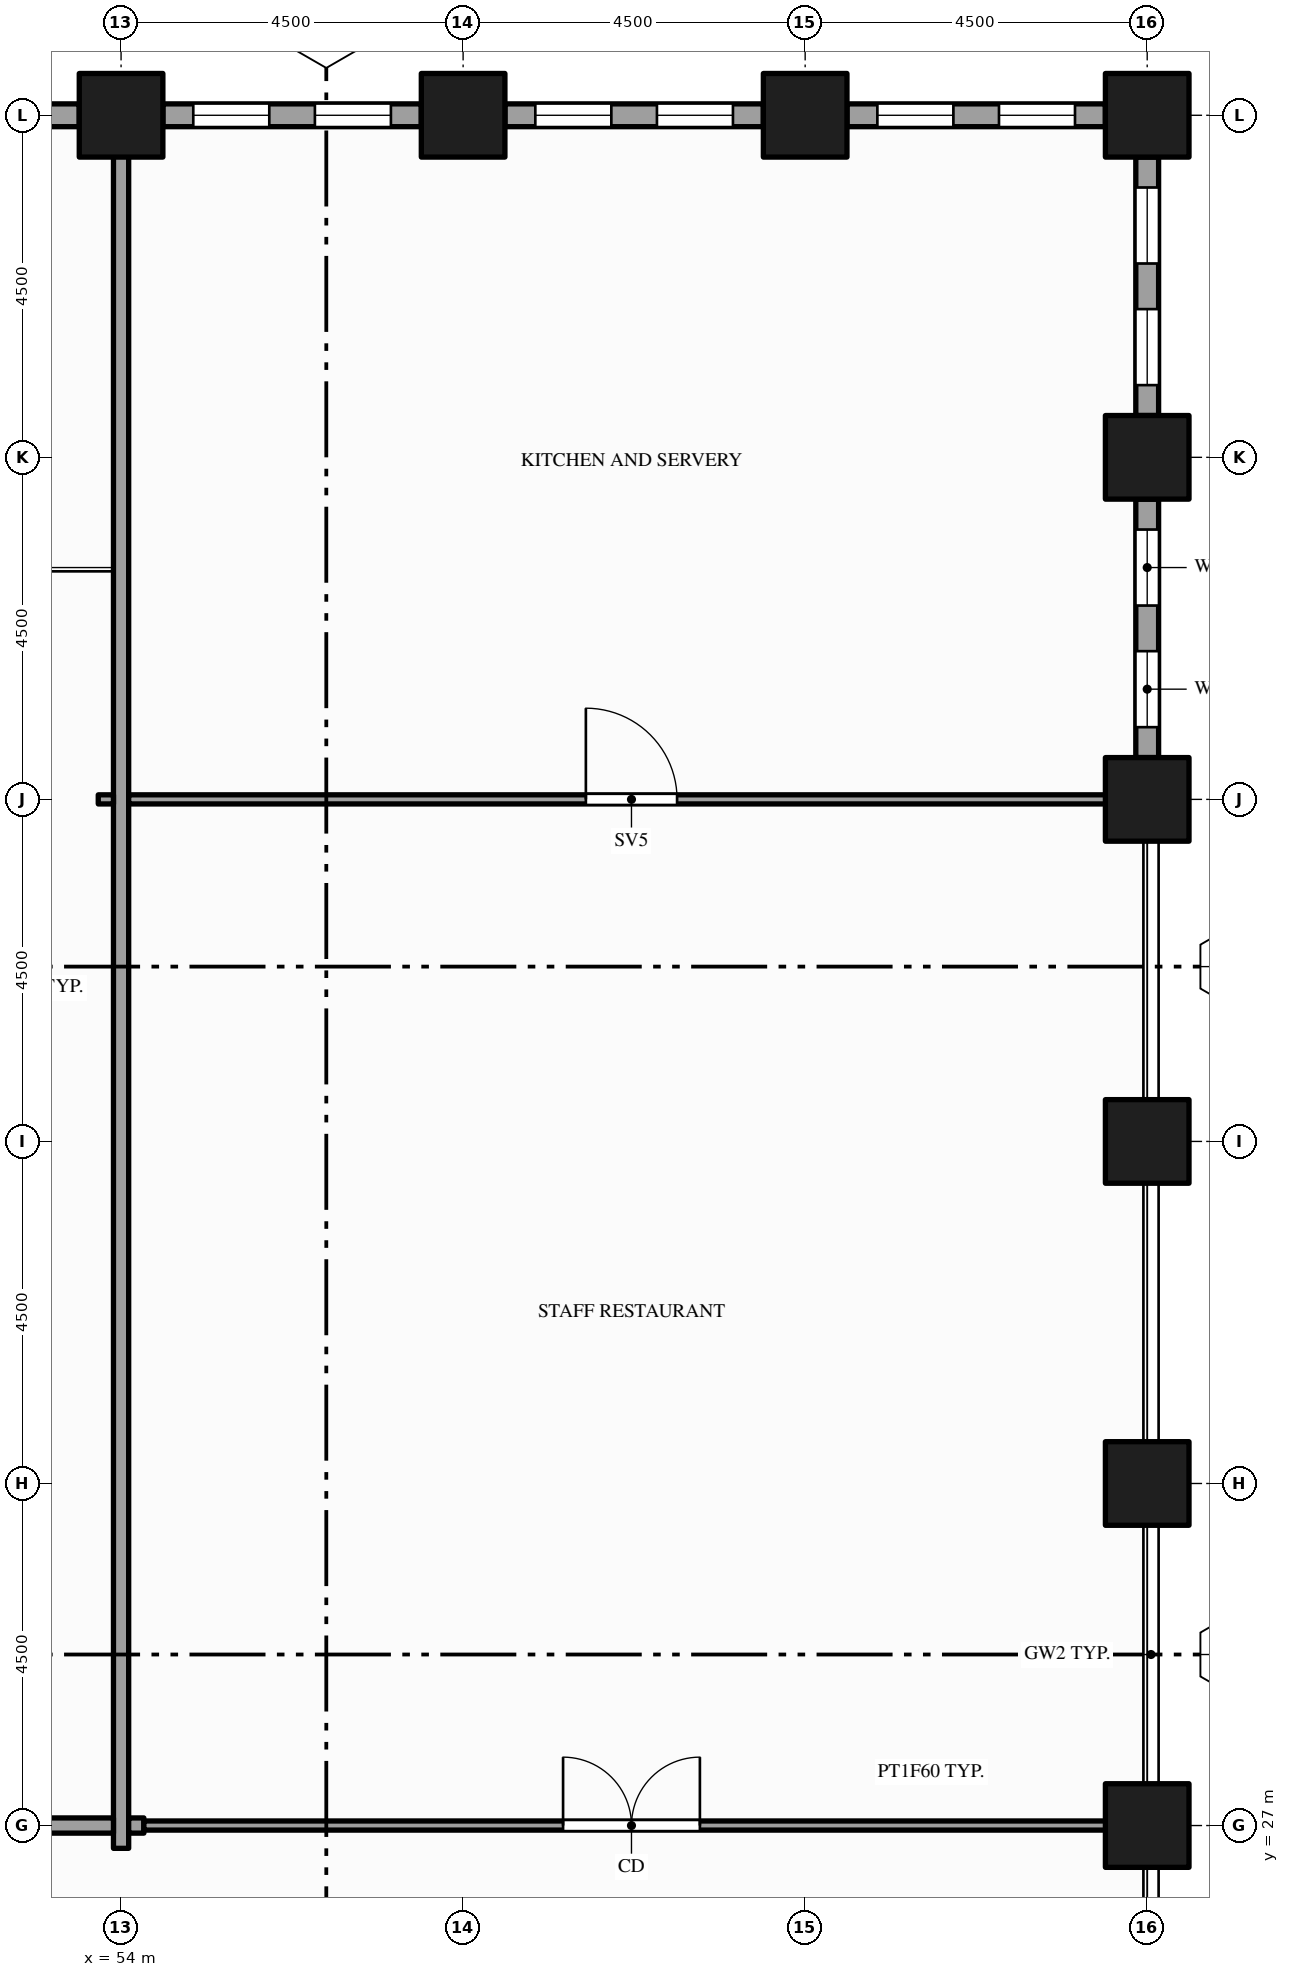
"""IFC4 building model, lengths in metres.
Left out: names, types, materials, properties, quantities, classifications, styles, units other than length and angle.
Written with IfcOpenShell. Run it as: python <this file> out.ifc"""

import sys

from ifc_helpers import new_model, si_unit, direction, frame, frame_2d, origin, origin_2d, place, context, subcontext, project, spatial, rectangle, hollow_rectangle, extrude, element, fill, save


model = new_model("IFC4")
c1 = context("Model", 3, precision=1e-05, world=origin(), true_north=direction((0.0, 1.0)))
c2 = subcontext(c1, "Body", "Model", "MODEL_VIEW")
j1 = project(units=[si_unit("LENGTHUNIT", "METRE"), si_unit("PLANEANGLEUNIT", "RADIAN")], contexts=[c1])
p1 = place(None, origin())
s1 = spatial("IfcSite", under=j1, at=p1, CompositionType="ELEMENT")
p2 = place(p1, origin())
s2 = spatial("IfcBuilding", under=s1, at=p2, CompositionType="ELEMENT")
p3 = place(p2, frame((0.0, 0.0, 8.0)))
s3 = spatial("IfcBuildingStorey", under=s2, at=p3, CompositionType="ELEMENT", Elevation=8.0)
for number, where, z_axis, x_axis in (
    (1, (54.0, 49.5, -0.25), (0.0, 0.0, 1.0), (1.0, 0.0, 0.0)),
    (2, (58.5, 49.5, -0.25), (0.0, 0.0, 1.0), (1.0, 0.0, 0.0)),
    (3, (63.0, 49.5, -0.25), (0.0, 0.0, 1.0), (1.0, 0.0, 0.0)),
    (4, (67.5, 27.0, -0.25), (0.0, 0.0, 1.0), (1.0, 0.0, 0.0)),
    (5, (67.5, 31.5, -0.25), (0.0, 0.0, 1.0), (1.0, 0.0, 0.0)),
    (6, (67.5, 36.0, -0.25), (0.0, 0.0, 1.0), (1.0, 0.0, 0.0)),
    (7, (67.5, 40.5, -0.25), (0.0, 0.0, 1.0), (1.0, 0.0, 0.0)),
    (8, (67.5, 45.0, -0.25), (0.0, 0.0, 1.0), (1.0, 0.0, 0.0)),
    (9, (67.5, 49.5, -0.25), (0.0, 0.0, 1.0), (1.0, 0.0, 0.0)),
):
    element("IfcColumn", number, at=place(p3, frame(where, z_axis=z_axis, x_axis=x_axis)), inside=s3, PredefinedType="COLUMN", context=c2, shape_type="SweptSolid", body=[
        extrude(hollow_rectangle(XDim=1.1, YDim=1.1, WallThickness=0.06, at=origin_2d()), origin(), (0.0, 0.0, 1.0), 6.0),
    ])
p4 = place(p3, frame((67.5, 41.05, 0.0), z_axis=(0.0, 0.0, 1.0), x_axis=(0.0, 1.0, 0.0)))
e10 = element("IfcWall", 10, at=p4, inside=s3, PredefinedType="STANDARD", context=c2, shape_type="SweptSolid", body=[
    extrude(rectangle(XDim=3.4, YDim=0.3, at=frame_2d((1.7, 0.0))), origin(), (0.0, 0.0, 1.0), 5.036),
])
p5 = place(p4, frame((0.4, 0.0, 0.9)))
e11 = element("IfcOpeningElement", 11, at=p5, cuts=e10, PredefinedType="OPENING", context=c2, shape_type="SweptSolid", body=[
    extrude(rectangle(XDim=1.0, YDim=3.5, at=frame_2d((0.5, 1.75))), frame((0.0, 0.16, 0.0), z_axis=(0.0, -1.0, 0.0), x_axis=(1.0, 0.0, 0.0)), (0.0, 0.0, 1.0), 0.32),
])
p6 = place(p4, frame((2.0, 0.0, 0.9)))
e12 = element("IfcOpeningElement", 12, at=p6, cuts=e10, PredefinedType="OPENING", context=c2, shape_type="SweptSolid", body=[
    extrude(rectangle(XDim=1.0, YDim=3.5, at=frame_2d((0.5, 1.75))), frame((0.0, 0.16, 0.0), z_axis=(0.0, -1.0, 0.0), x_axis=(1.0, 0.0, 0.0)), (0.0, 0.0, 1.0), 0.32),
])
p7 = place(p3, frame((67.5, 45.55, 0.0), z_axis=(0.0, 0.0, 1.0), x_axis=(0.0, 1.0, 0.0)))
e13 = element("IfcWall", 13, at=p7, inside=s3, PredefinedType="STANDARD", context=c2, shape_type="SweptSolid", body=[
    extrude(rectangle(XDim=3.4, YDim=0.3, at=frame_2d((1.7, 0.0))), origin(), (0.0, 0.0, 1.0), 5.036),
])
p8 = place(p7, frame((0.4, 0.0, 0.9)))
e14 = element("IfcOpeningElement", 14, at=p8, cuts=e13, PredefinedType="OPENING", context=c2, shape_type="SweptSolid", body=[
    extrude(rectangle(XDim=1.0, YDim=3.5, at=frame_2d((0.5, 1.75))), frame((0.0, 0.16, 0.0), z_axis=(0.0, -1.0, 0.0), x_axis=(1.0, 0.0, 0.0)), (0.0, 0.0, 1.0), 0.32),
])
p9 = place(p7, frame((2.0, 0.0, 0.9)))
e15 = element("IfcOpeningElement", 15, at=p9, cuts=e13, PredefinedType="OPENING", context=c2, shape_type="SweptSolid", body=[
    extrude(rectangle(XDim=1.0, YDim=3.5, at=frame_2d((0.5, 1.75))), frame((0.0, 0.16, 0.0), z_axis=(0.0, -1.0, 0.0), x_axis=(1.0, 0.0, 0.0)), (0.0, 0.0, 1.0), 0.32),
])
p10 = place(p3, frame((66.95, 49.5, 0.0), z_axis=(0.0, 0.0, 1.0), x_axis=(-1.0, 0.0, 0.0)))
e16 = element("IfcWall", 16, at=p10, inside=s3, PredefinedType="STANDARD", context=c2, shape_type="SweptSolid", body=[
    extrude(rectangle(XDim=3.4, YDim=0.3, at=frame_2d((1.7, 0.0))), origin(), (0.0, 0.0, 1.0), 5.036),
])
p11 = place(p10, frame((0.4, 0.0, 0.9)))
e17 = element("IfcOpeningElement", 17, at=p11, cuts=e16, PredefinedType="OPENING", context=c2, shape_type="SweptSolid", body=[
    extrude(rectangle(XDim=1.0, YDim=3.5, at=frame_2d((0.5, 1.75))), frame((0.0, 0.16, 0.0), z_axis=(0.0, -1.0, 0.0), x_axis=(1.0, 0.0, 0.0)), (0.0, 0.0, 1.0), 0.32),
])
p12 = place(p10, frame((2.0, 0.0, 0.9)))
e18 = element("IfcOpeningElement", 18, at=p12, cuts=e16, PredefinedType="OPENING", context=c2, shape_type="SweptSolid", body=[
    extrude(rectangle(XDim=1.0, YDim=3.5, at=frame_2d((0.5, 1.75))), frame((0.0, 0.16, 0.0), z_axis=(0.0, -1.0, 0.0), x_axis=(1.0, 0.0, 0.0)), (0.0, 0.0, 1.0), 0.32),
])
p13 = place(p3, frame((62.45, 49.5, 0.0), z_axis=(0.0, 0.0, 1.0), x_axis=(-1.0, 0.0, 0.0)))
e19 = element("IfcWall", 19, at=p13, inside=s3, PredefinedType="STANDARD", context=c2, shape_type="SweptSolid", body=[
    extrude(rectangle(XDim=3.4, YDim=0.3, at=frame_2d((1.7, 0.0))), origin(), (0.0, 0.0, 1.0), 5.036),
])
p14 = place(p13, frame((0.4, 0.0, 0.9)))
e20 = element("IfcOpeningElement", 20, at=p14, cuts=e19, PredefinedType="OPENING", context=c2, shape_type="SweptSolid", body=[
    extrude(rectangle(XDim=1.0, YDim=3.5, at=frame_2d((0.5, 1.75))), frame((0.0, 0.16, 0.0), z_axis=(0.0, -1.0, 0.0), x_axis=(1.0, 0.0, 0.0)), (0.0, 0.0, 1.0), 0.32),
])
p15 = place(p13, frame((2.0, 0.0, 0.9)))
e21 = element("IfcOpeningElement", 21, at=p15, cuts=e19, PredefinedType="OPENING", context=c2, shape_type="SweptSolid", body=[
    extrude(rectangle(XDim=1.0, YDim=3.5, at=frame_2d((0.5, 1.75))), frame((0.0, 0.16, 0.0), z_axis=(0.0, -1.0, 0.0), x_axis=(1.0, 0.0, 0.0)), (0.0, 0.0, 1.0), 0.32),
])
p16 = place(p3, frame((57.95, 49.5, 0.0), z_axis=(0.0, 0.0, 1.0), x_axis=(-1.0, 0.0, 0.0)))
e22 = element("IfcWall", 22, at=p16, inside=s3, PredefinedType="STANDARD", context=c2, shape_type="SweptSolid", body=[
    extrude(rectangle(XDim=3.4, YDim=0.3, at=frame_2d((1.7, 0.0))), origin(), (0.0, 0.0, 1.0), 5.036),
])
p17 = place(p16, frame((0.4, 0.0, 0.9)))
e23 = element("IfcOpeningElement", 23, at=p17, cuts=e22, PredefinedType="OPENING", context=c2, shape_type="SweptSolid", body=[
    extrude(rectangle(XDim=1.0, YDim=3.5, at=frame_2d((0.5, 1.75))), frame((0.0, 0.16, 0.0), z_axis=(0.0, -1.0, 0.0), x_axis=(1.0, 0.0, 0.0)), (0.0, 0.0, 1.0), 0.32),
])
p18 = place(p16, frame((2.0, 0.0, 0.9)))
e24 = element("IfcOpeningElement", 24, at=p18, cuts=e22, PredefinedType="OPENING", context=c2, shape_type="SweptSolid", body=[
    extrude(rectangle(XDim=1.0, YDim=3.5, at=frame_2d((0.5, 1.75))), frame((0.0, 0.16, 0.0), z_axis=(0.0, -1.0, 0.0), x_axis=(1.0, 0.0, 0.0)), (0.0, 0.0, 1.0), 0.32),
])
p19 = place(p3, frame((53.45, 49.5, 0.0), z_axis=(0.0, 0.0, 1.0), x_axis=(-1.0, 0.0, 0.0)))
e25 = element("IfcWall", 25, at=p19, inside=s3, PredefinedType="STANDARD", context=c2, shape_type="SweptSolid", body=[
    extrude(rectangle(XDim=3.4, YDim=0.3, at=frame_2d((1.7, 0.0))), origin(), (0.0, 0.0, 1.0), 5.036),
])
p20 = place(p19, frame((0.4, 0.0, 0.9)))
e26 = element("IfcOpeningElement", 26, at=p20, cuts=e25, PredefinedType="OPENING", context=c2, shape_type="SweptSolid", body=[
    extrude(rectangle(XDim=1.0, YDim=3.5, at=frame_2d((0.5, 1.75))), frame((0.0, 0.16, 0.0), z_axis=(0.0, -1.0, 0.0), x_axis=(1.0, 0.0, 0.0)), (0.0, 0.0, 1.0), 0.32),
])
p21 = place(p19, frame((2.0, 0.0, 0.9)))
e27 = element("IfcOpeningElement", 27, at=p21, cuts=e25, PredefinedType="OPENING", context=c2, shape_type="SweptSolid", body=[
    extrude(rectangle(XDim=1.0, YDim=3.5, at=frame_2d((0.5, 1.75))), frame((0.0, 0.16, 0.0), z_axis=(0.0, -1.0, 0.0), x_axis=(1.0, 0.0, 0.0)), (0.0, 0.0, 1.0), 0.32),
])
p22 = place(p3, frame((54.0, 26.7, 0.0), z_axis=(0.0, 0.0, 1.0), x_axis=(0.0, 1.0, 0.0)))
e28 = element("IfcWall", 28, at=p22, inside=s3, PredefinedType="PARTITIONING", context=c2, shape_type="SweptSolid", body=[
    extrude(rectangle(XDim=22.65, YDim=0.2, at=frame_2d((11.325, 0.0))), origin(), (0.0, 0.0, 1.0), 4.66),
])
p23 = place(p3, frame((27.1, 27.0, 0.0), z_axis=(0.0, 0.0, 1.0), x_axis=(1.0, 0.0, 0.0)))
e29 = element("IfcWall", 29, at=p23, inside=s3, PredefinedType="PARTITIONING", context=c2, shape_type="SweptSolid", body=[
    extrude(rectangle(XDim=26.8, YDim=0.2, at=frame_2d((13.4, 0.0))), origin(), (0.0, 0.0, 1.0), 4.66),
])
p24 = place(p3, frame((54.1, 27.0, 0.0), z_axis=(0.0, 0.0, 1.0), x_axis=(1.0, 0.0, 0.0)))
e30 = element("IfcWall", 30, at=p24, inside=s3, PredefinedType="PARTITIONING", context=c2, shape_type="SweptSolid", body=[
    extrude(rectangle(XDim=0.2, YDim=0.2, at=frame_2d((0.1, 0.0))), origin(), (0.0, 0.0, 1.0), 4.66),
])
p25 = place(p3, frame((54.3, 27.0, 0.0), z_axis=(0.0, 0.0, 1.0), x_axis=(1.0, 0.0, 0.0)))
e31 = element("IfcWall", 31, at=p25, inside=s3, PredefinedType="PARTITIONING", context=c2, shape_type="SweptSolid", body=[
    extrude(rectangle(XDim=13.05, YDim=0.12, at=frame_2d((6.525, 0.0))), origin(), (0.0, 0.0, 1.0), 4.66),
])
p26 = place(p25, frame((5.515, 0.0, 0.0)))
e32 = element("IfcOpeningElement", 32, at=p26, cuts=e31, PredefinedType="OPENING", context=c2, shape_type="SweptSolid", body=[
    extrude(rectangle(XDim=1.8, YDim=2.1, at=frame_2d((0.9, 1.05))), frame((0.0, 0.07, 0.0), z_axis=(0.0, -1.0, 0.0), x_axis=(1.0, 0.0, 0.0)), (0.0, 0.0, 1.0), 0.14),
])
p27 = place(p3, frame((53.7, 40.5, 0.0), z_axis=(0.0, 0.0, 1.0), x_axis=(1.0, 0.0, 0.0)))
e33 = element("IfcWall", 33, at=p27, inside=s3, PredefinedType="PARTITIONING", context=c2, shape_type="SweptSolid", body=[
    extrude(rectangle(XDim=0.2, YDim=0.12, at=frame_2d((0.1, 0.0))), origin(), (0.0, 0.0, 1.0), 4.66),
])
p28 = place(p3, frame((54.1, 40.5, 0.0), z_axis=(0.0, 0.0, 1.0), x_axis=(1.0, 0.0, 0.0)))
e34 = element("IfcWall", 34, at=p28, inside=s3, PredefinedType="PARTITIONING", context=c2, shape_type="SweptSolid", body=[
    extrude(rectangle(XDim=13.25, YDim=0.12, at=frame_2d((6.625, 0.0))), origin(), (0.0, 0.0, 1.0), 4.66),
])
p29 = place(p28, frame((6.015, 0.0, 0.0)))
e35 = element("IfcOpeningElement", 35, at=p29, cuts=e34, PredefinedType="OPENING", context=c2, shape_type="SweptSolid", body=[
    extrude(rectangle(XDim=1.2, YDim=2.1, at=frame_2d((0.6, 1.05))), frame((0.0, 0.07, 0.0), z_axis=(0.0, -1.0, 0.0), x_axis=(1.0, 0.0, 0.0)), (0.0, 0.0, 1.0), 0.14),
])
p30 = place(p5, origin())
e36 = element("IfcWindow", 36, at=p30, inside=s3, PartitioningType="SINGLE_PANEL", PredefinedType="WINDOW", context=c2, shape_type="SweptSolid", body=[
    extrude(rectangle(XDim=1.0, YDim=3.5, at=frame_2d((0.5, 1.75))), frame((0.0, 0.03, 0.0), z_axis=(0.0, -1.0, 0.0), x_axis=(1.0, 0.0, 0.0)), (0.0, 0.0, 1.0), 0.06),
])
fill(e11, e36)
p31 = place(p6, origin())
e37 = element("IfcWindow", 37, at=p31, inside=s3, PartitioningType="SINGLE_PANEL", PredefinedType="WINDOW", context=c2, shape_type="SweptSolid", body=[
    extrude(rectangle(XDim=1.0, YDim=3.5, at=frame_2d((0.5, 1.75))), frame((0.0, 0.03, 0.0), z_axis=(0.0, -1.0, 0.0), x_axis=(1.0, 0.0, 0.0)), (0.0, 0.0, 1.0), 0.06),
])
fill(e12, e37)
p32 = place(p8, origin())
e38 = element("IfcWindow", 38, at=p32, inside=s3, PartitioningType="SINGLE_PANEL", PredefinedType="WINDOW", context=c2, shape_type="SweptSolid", body=[
    extrude(rectangle(XDim=1.0, YDim=3.5, at=frame_2d((0.5, 1.75))), frame((0.0, 0.03, 0.0), z_axis=(0.0, -1.0, 0.0), x_axis=(1.0, 0.0, 0.0)), (0.0, 0.0, 1.0), 0.06),
])
fill(e14, e38)
p33 = place(p9, origin())
e39 = element("IfcWindow", 39, at=p33, inside=s3, PartitioningType="SINGLE_PANEL", PredefinedType="WINDOW", context=c2, shape_type="SweptSolid", body=[
    extrude(rectangle(XDim=1.0, YDim=3.5, at=frame_2d((0.5, 1.75))), frame((0.0, 0.03, 0.0), z_axis=(0.0, -1.0, 0.0), x_axis=(1.0, 0.0, 0.0)), (0.0, 0.0, 1.0), 0.06),
])
fill(e15, e39)
p34 = place(p11, origin())
e40 = element("IfcWindow", 40, at=p34, inside=s3, PartitioningType="SINGLE_PANEL", PredefinedType="WINDOW", context=c2, shape_type="SweptSolid", body=[
    extrude(rectangle(XDim=1.0, YDim=3.5, at=frame_2d((0.5, 1.75))), frame((0.0, 0.03, 0.0), z_axis=(0.0, -1.0, 0.0), x_axis=(1.0, 0.0, 0.0)), (0.0, 0.0, 1.0), 0.06),
])
fill(e17, e40)
p35 = place(p12, origin())
e41 = element("IfcWindow", 41, at=p35, inside=s3, PartitioningType="SINGLE_PANEL", PredefinedType="WINDOW", context=c2, shape_type="SweptSolid", body=[
    extrude(rectangle(XDim=1.0, YDim=3.5, at=frame_2d((0.5, 1.75))), frame((0.0, 0.03, 0.0), z_axis=(0.0, -1.0, 0.0), x_axis=(1.0, 0.0, 0.0)), (0.0, 0.0, 1.0), 0.06),
])
fill(e18, e41)
p36 = place(p14, origin())
e42 = element("IfcWindow", 42, at=p36, inside=s3, PartitioningType="SINGLE_PANEL", PredefinedType="WINDOW", context=c2, shape_type="SweptSolid", body=[
    extrude(rectangle(XDim=1.0, YDim=3.5, at=frame_2d((0.5, 1.75))), frame((0.0, 0.03, 0.0), z_axis=(0.0, -1.0, 0.0), x_axis=(1.0, 0.0, 0.0)), (0.0, 0.0, 1.0), 0.06),
])
fill(e20, e42)
p37 = place(p15, origin())
e43 = element("IfcWindow", 43, at=p37, inside=s3, PartitioningType="SINGLE_PANEL", PredefinedType="WINDOW", context=c2, shape_type="SweptSolid", body=[
    extrude(rectangle(XDim=1.0, YDim=3.5, at=frame_2d((0.5, 1.75))), frame((0.0, 0.03, 0.0), z_axis=(0.0, -1.0, 0.0), x_axis=(1.0, 0.0, 0.0)), (0.0, 0.0, 1.0), 0.06),
])
fill(e21, e43)
p38 = place(p17, origin())
e44 = element("IfcWindow", 44, at=p38, inside=s3, PartitioningType="SINGLE_PANEL", PredefinedType="WINDOW", context=c2, shape_type="SweptSolid", body=[
    extrude(rectangle(XDim=1.0, YDim=3.5, at=frame_2d((0.5, 1.75))), frame((0.0, 0.03, 0.0), z_axis=(0.0, -1.0, 0.0), x_axis=(1.0, 0.0, 0.0)), (0.0, 0.0, 1.0), 0.06),
])
fill(e23, e44)
p39 = place(p18, origin())
e45 = element("IfcWindow", 45, at=p39, inside=s3, PartitioningType="SINGLE_PANEL", PredefinedType="WINDOW", context=c2, shape_type="SweptSolid", body=[
    extrude(rectangle(XDim=1.0, YDim=3.5, at=frame_2d((0.5, 1.75))), frame((0.0, 0.03, 0.0), z_axis=(0.0, -1.0, 0.0), x_axis=(1.0, 0.0, 0.0)), (0.0, 0.0, 1.0), 0.06),
])
fill(e24, e45)
p40 = place(p26, origin())
e46 = element("IfcDoor", 46, at=p40, inside=s3, OperationType="DOUBLE_DOOR_SINGLE_SWING", PredefinedType="DOOR", context=c2, shape_type="SweptSolid", body=[
    extrude(rectangle(XDim=1.8, YDim=2.1, at=frame_2d((0.9, 1.05))), frame((0.0, 0.025, 0.0), z_axis=(0.0, -1.0, 0.0), x_axis=(1.0, 0.0, 0.0)), (0.0, 0.0, 1.0), 0.05),
])
fill(e32, e46)
p41 = place(p29, origin())
e47 = element("IfcDoor", 47, at=p41, inside=s3, OperationType="SINGLE_SWING_LEFT", PredefinedType="DOOR", context=c2, shape_type="SweptSolid", body=[
    extrude(rectangle(XDim=1.2, YDim=2.1, at=frame_2d((0.6, 1.05))), frame((0.0, 0.025, 0.0), z_axis=(0.0, -1.0, 0.0), x_axis=(1.0, 0.0, 0.0)), (0.0, 0.0, 1.0), 0.05),
])
fill(e35, e47)
save(model, sys.argv[1])
